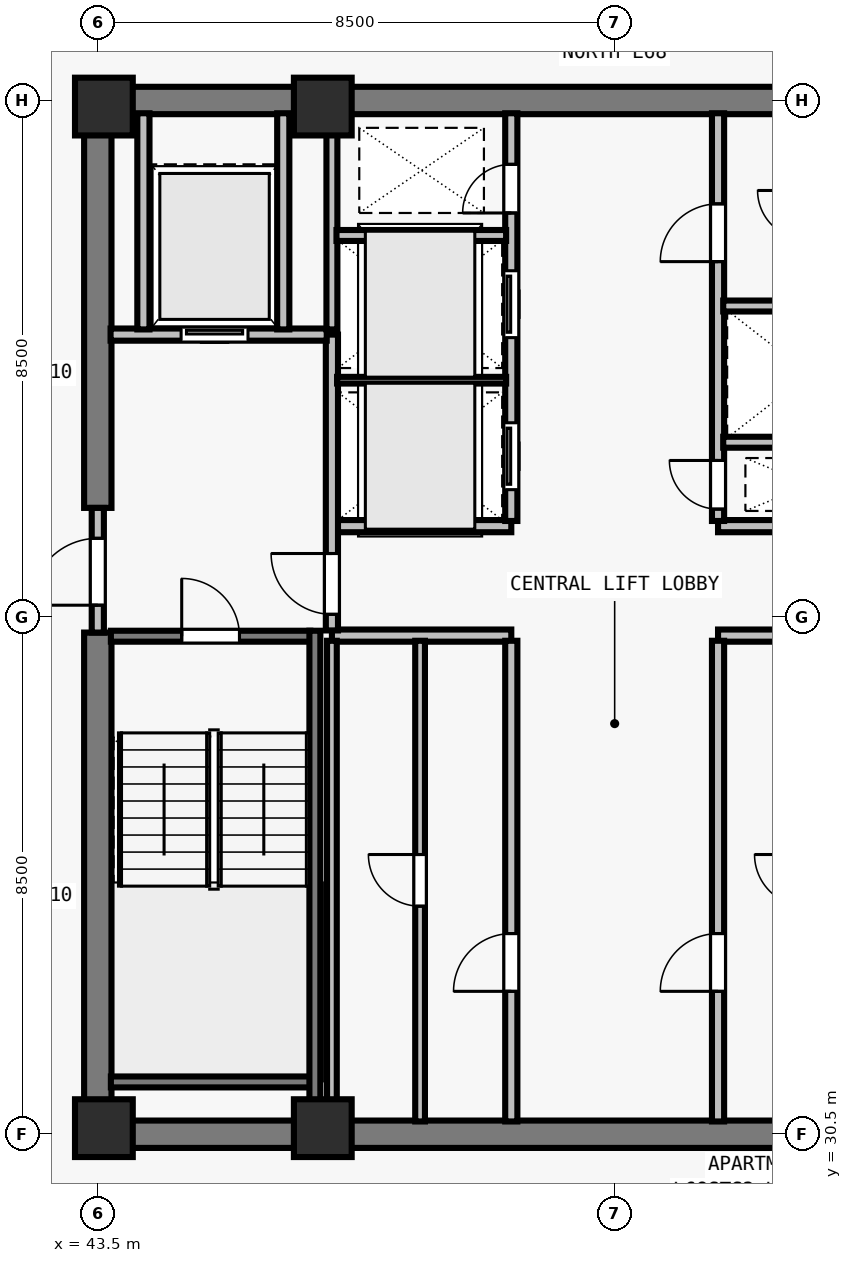
"""IFC4 building model, lengths in metres.
Left out: names, types, materials, properties, quantities, classifications, styles, units other than length and angle.
Written with IfcOpenShell. Run it as: python <this file> out.ifc"""

import sys

from ifc_helpers import new_model, si_unit, direction, frame, frame_2d, origin, origin_2d, place, context, subcontext, project, spatial, rectangle, extrude, element, fill, save


model = new_model("IFC4")
c1 = context("Model", 3, precision=1e-05, world=origin(), true_north=direction((0.0, 1.0)))
c2 = subcontext(c1, "Body", "Model", "MODEL_VIEW")
j1 = project(units=[si_unit("LENGTHUNIT", "METRE"), si_unit("PLANEANGLEUNIT", "RADIAN")], contexts=[c1])
p1 = place(None, origin())
s1 = spatial("IfcSite", under=j1, at=p1, CompositionType="ELEMENT")
p2 = place(p1, origin())
s2 = spatial("IfcBuilding", under=s1, at=p2, CompositionType="ELEMENT")
p3 = place(p2, frame((0.0, 0.0, 248.0)))
s3 = spatial("IfcBuildingStorey", under=s2, at=p3, CompositionType="ELEMENT", Elevation=248.0)
for number, where, z_axis, x_axis in (
    (1, (43.6, 30.6, 0.0), (0.0, 0.0, 1.0), (1.0, 0.0, 0.0)),
    (2, (47.2, 30.6, 0.0), (0.0, 0.0, 1.0), (1.0, 0.0, 0.0)),
    (3, (43.6, 47.4, 0.0), (0.0, 0.0, 1.0), (1.0, 0.0, 0.0)),
    (4, (47.2, 47.4, 0.0), (0.0, 0.0, 1.0), (1.0, 0.0, 0.0)),
):
    element("IfcColumn", number, at=place(p3, frame(where, z_axis=z_axis, x_axis=x_axis)), inside=s3, PredefinedType="COLUMN", context=c2, shape_type="SweptSolid", body=[
        extrude(rectangle(XDim=0.95, YDim=0.95, at=origin_2d()), origin(), (0.0, 0.0, 1.0), 3.5),
    ])
for number, where, z_axis, x_axis in (
    (5, (43.275, 30.5, 0.0), (0.0, 0.0, 1.0), (1.0, 0.0, 0.0)),
    (6, (43.275, 47.5, 0.0), (0.0, 0.0, 1.0), (1.0, 0.0, 0.0)),
):
    element("IfcWall", number, at=place(p3, frame(where, z_axis=z_axis, x_axis=x_axis)), inside=s3, PredefinedType="SHEAR", context=c2, shape_type="SweptSolid", body=[
        extrude(rectangle(XDim=17.45, YDim=0.45, at=frame_2d((8.725, 0.0))), origin(), (0.0, 0.0, 1.0), 3.29),
    ])
p4 = place(p3, frame((43.5, 30.715, 0.0), z_axis=(0.0, 0.0, 1.0), x_axis=(0.0, 1.0, 0.0)))
e7 = element("IfcWall", 7, at=p4, inside=s3, PredefinedType="SHEAR", context=c2, shape_type="SweptSolid", body=[
    extrude(rectangle(XDim=8.035, YDim=0.45, at=frame_2d((4.018, 0.0))), origin(), (0.0, 0.0, 1.0), 3.29),
])
p5 = place(p3, frame((43.5, 40.8, 0.0), z_axis=(0.0, 0.0, 1.0), x_axis=(0.0, 1.0, 0.0)))
e8 = element("IfcWall", 8, at=p5, inside=s3, PredefinedType="SHEAR", context=c2, shape_type="SweptSolid", body=[
    extrude(rectangle(XDim=6.485, YDim=0.45, at=frame_2d((3.242, 0.0))), origin(), (0.0, 0.0, 1.0), 3.29),
])
for number, where, z_axis, x_axis in (
    (9, (47.35, 38.7, 0.0), (0.0, 0.0, 1.0), (1.0, 0.0, 0.0)),
    (10, (47.35, 40.5, 0.0), (0.0, 0.0, 1.0), (1.0, 0.0, 0.0)),
    (11, (53.7, 38.7, 0.0), (0.0, 0.0, 1.0), (1.0, 0.0, 0.0)),
    (12, (53.7, 40.5, 0.0), (0.0, 0.0, 1.0), (1.0, 0.0, 0.0)),
):
    element("IfcWall", number, at=place(p3, frame(where, z_axis=z_axis, x_axis=x_axis)), inside=s3, PredefinedType="SOLIDWALL", context=c2, shape_type="SweptSolid", body=[
        extrude(rectangle(XDim=2.95, YDim=0.2, at=frame_2d((1.475, 0.0))), origin(), (0.0, 0.0, 1.0), 3.29),
    ])
p6 = place(p3, frame((50.3, 30.71, 0.0), z_axis=(0.0, 0.0, 1.0), x_axis=(0.0, 1.0, 0.0)))
e13 = element("IfcWall", 13, at=p6, inside=s3, PredefinedType="SOLIDWALL", context=c2, shape_type="SweptSolid", body=[
    extrude(rectangle(XDim=7.905, YDim=0.2, at=frame_2d((3.953, 0.0))), origin(), (0.0, 0.0, 1.0), 3.29),
])
p7 = place(p6, frame((2.14, 0.0, 0.0)))
e14 = element("IfcOpeningElement", 14, at=p7, cuts=e13, PredefinedType="OPENING", context=c2, shape_type="SweptSolid", body=[
    extrude(rectangle(XDim=0.95, YDim=2.12, at=frame_2d((0.475, 1.06))), frame((0.0, 0.11, 0.0), z_axis=(0.0, -1.0, 0.0), x_axis=(1.0, 0.0, 0.0)), (0.0, 0.0, 1.0), 0.22),
])
p8 = place(p3, frame((53.7, 30.71, 0.0), z_axis=(0.0, 0.0, 1.0), x_axis=(0.0, 1.0, 0.0)))
e15 = element("IfcWall", 15, at=p8, inside=s3, PredefinedType="SOLIDWALL", context=c2, shape_type="SweptSolid", body=[
    extrude(rectangle(XDim=7.905, YDim=0.2, at=frame_2d((3.953, 0.0))), origin(), (0.0, 0.0, 1.0), 3.29),
])
p9 = place(p8, frame((2.14, 0.0, 0.0)))
e16 = element("IfcOpeningElement", 16, at=p9, cuts=e15, PredefinedType="OPENING", context=c2, shape_type="SweptSolid", body=[
    extrude(rectangle(XDim=0.95, YDim=2.12, at=frame_2d((0.475, 1.06))), frame((0.0, 0.11, 0.0), z_axis=(0.0, -1.0, 0.0), x_axis=(1.0, 0.0, 0.0)), (0.0, 0.0, 1.0), 0.22),
])
p10 = place(p3, frame((50.3, 40.585, 0.0), z_axis=(0.0, 0.0, 1.0), x_axis=(0.0, 1.0, 0.0)))
e17 = element("IfcWall", 17, at=p10, inside=s3, PredefinedType="SOLIDWALL", context=c2, shape_type="SweptSolid", body=[
    extrude(rectangle(XDim=6.705, YDim=0.2, at=frame_2d((3.353, 0.0))), origin(), (0.0, 0.0, 1.0), 3.29),
])
p11 = place(p10, frame((0.515, 0.0, 0.0)))
e18 = element("IfcOpeningElement", 18, at=p11, cuts=e17, PredefinedType="OPENING", context=c2, shape_type="SweptSolid", body=[
    extrude(rectangle(XDim=1.1, YDim=2.2, at=frame_2d((0.55, 1.1))), frame((0.0, 0.11, 0.0), z_axis=(0.0, -1.0, 0.0), x_axis=(1.0, 0.0, 0.0)), (0.0, 0.0, 1.0), 0.22),
])
p12 = place(p10, frame((3.015, 0.0, 0.0)))
e19 = element("IfcOpeningElement", 19, at=p12, cuts=e17, PredefinedType="OPENING", context=c2, shape_type="SweptSolid", body=[
    extrude(rectangle(XDim=1.1, YDim=2.2, at=frame_2d((0.55, 1.1))), frame((0.0, 0.11, 0.0), z_axis=(0.0, -1.0, 0.0), x_axis=(1.0, 0.0, 0.0)), (0.0, 0.0, 1.0), 0.22),
])
p13 = place(p10, frame((5.065, 0.0, 0.0)))
e20 = element("IfcOpeningElement", 20, at=p13, cuts=e17, PredefinedType="OPENING", context=c2, shape_type="SweptSolid", body=[
    extrude(rectangle(XDim=0.8, YDim=2.08, at=frame_2d((0.4, 1.04))), frame((0.0, 0.11, 0.0), z_axis=(0.0, -1.0, 0.0), x_axis=(1.0, 0.0, 0.0)), (0.0, 0.0, 1.0), 0.22),
])
p14 = place(p3, frame((53.7, 40.585, 0.0), z_axis=(0.0, 0.0, 1.0), x_axis=(0.0, 1.0, 0.0)))
e21 = element("IfcWall", 21, at=p14, inside=s3, PredefinedType="SOLIDWALL", context=c2, shape_type="SweptSolid", body=[
    extrude(rectangle(XDim=6.705, YDim=0.2, at=frame_2d((3.353, 0.0))), origin(), (0.0, 0.0, 1.0), 3.29),
])
p15 = place(p14, frame((0.195, 0.0, 0.0)))
e22 = element("IfcOpeningElement", 22, at=p15, cuts=e21, PredefinedType="OPENING", context=c2, shape_type="SweptSolid", body=[
    extrude(rectangle(XDim=0.8, YDim=2.08, at=frame_2d((0.4, 1.04))), frame((0.0, 0.11, 0.0), z_axis=(0.0, -1.0, 0.0), x_axis=(1.0, 0.0, 0.0)), (0.0, 0.0, 1.0), 0.22),
])
p16 = place(p14, frame((4.265, 0.0, 0.0)))
e23 = element("IfcOpeningElement", 23, at=p16, cuts=e21, PredefinedType="OPENING", context=c2, shape_type="SweptSolid", body=[
    extrude(rectangle(XDim=0.95, YDim=2.12, at=frame_2d((0.475, 1.06))), frame((0.0, 0.11, 0.0), z_axis=(0.0, -1.0, 0.0), x_axis=(1.0, 0.0, 0.0)), (0.0, 0.0, 1.0), 0.22),
])
p17 = place(p3, frame((43.5, 38.75, 0.0), z_axis=(0.0, 0.0, 1.0), x_axis=(0.0, 1.0, 0.0)))
e24 = element("IfcWall", 24, at=p17, inside=s3, PredefinedType="SOLIDWALL", context=c2, shape_type="SweptSolid", body=[
    extrude(rectangle(XDim=2.05, YDim=0.2, at=frame_2d((1.025, 0.0))), origin(), (0.0, 0.0, 1.0), 3.29),
])
p18 = place(p17, frame((0.45, 0.0, 0.0)))
e25 = element("IfcOpeningElement", 25, at=p18, cuts=e24, PredefinedType="OPENING", context=c2, shape_type="SweptSolid", body=[
    extrude(rectangle(XDim=1.1, YDim=2.15, at=frame_2d((0.55, 1.075))), frame((0.0, 0.11, 0.0), z_axis=(0.0, -1.0, 0.0), x_axis=(1.0, 0.0, 0.0)), (0.0, 0.0, 1.0), 0.22),
])
p19 = place(p3, frame((47.35, 38.785, 0.0), z_axis=(0.0, 0.0, 1.0), x_axis=(0.0, 1.0, 0.0)))
e26 = element("IfcWall", 26, at=p19, inside=s3, PredefinedType="SOLIDWALL", context=c2, shape_type="SweptSolid", body=[
    extrude(rectangle(XDim=4.865, YDim=0.2, at=frame_2d((2.433, 0.0))), origin(), (0.0, 0.0, 1.0), 3.29),
])
p20 = place(p19, frame((0.265, 0.0, 0.0)))
e27 = element("IfcOpeningElement", 27, at=p20, cuts=e26, PredefinedType="OPENING", context=c2, shape_type="SweptSolid", body=[
    extrude(rectangle(XDim=1.0, YDim=2.15, at=frame_2d((0.5, 1.075))), frame((0.0, 0.11, 0.0), z_axis=(0.0, -1.0, 0.0), x_axis=(1.0, 0.0, 0.0)), (0.0, 0.0, 1.0), 0.22),
])
p21 = place(p3, frame((43.71, 43.65, 0.0), z_axis=(0.0, 0.0, 1.0), x_axis=(1.0, 0.0, 0.0)))
e28 = element("IfcWall", 28, at=p21, inside=s3, PredefinedType="SOLIDWALL", context=c2, shape_type="SweptSolid", body=[
    extrude(rectangle(XDim=3.555, YDim=0.2, at=frame_2d((1.777, 0.0))), origin(), (0.0, 0.0, 1.0), 3.29),
])
p22 = place(p21, frame((1.16, 0.0, 0.0)))
e29 = element("IfcOpeningElement", 29, at=p22, cuts=e28, PredefinedType="OPENING", context=c2, shape_type="SweptSolid", body=[
    extrude(rectangle(XDim=1.1, YDim=2.2, at=frame_2d((0.55, 1.1))), frame((0.0, 0.11, 0.0), z_axis=(0.0, -1.0, 0.0), x_axis=(1.0, 0.0, 0.0)), (0.0, 0.0, 1.0), 0.22),
])
for number, where, z_axis, x_axis in (
    (30, (46.55, 43.735, 0.0), (0.0, 0.0, 1.0), (0.0, 1.0, 0.0)),
    (31, (44.25, 43.735, 0.0), (0.0, 0.0, 1.0), (0.0, 1.0, 0.0)),
):
    element("IfcWall", number, at=place(p3, frame(where, z_axis=z_axis, x_axis=x_axis)), inside=s3, PredefinedType="SOLIDWALL", context=c2, shape_type="SweptSolid", body=[
        extrude(rectangle(XDim=3.555, YDim=0.2, at=frame_2d((1.777, 0.0))), origin(), (0.0, 0.0, 1.0), 3.29),
    ])
p23 = place(p3, frame((47.35, 30.71, 0.0), z_axis=(0.0, 0.0, 1.0), x_axis=(0.0, 1.0, 0.0)))
e32 = element("IfcWall", 32, at=p23, inside=s3, PredefinedType="PARTITIONING", context=c2, shape_type="SweptSolid", body=[
    extrude(rectangle(XDim=7.905, YDim=0.16, at=frame_2d((3.953, 0.0))), origin(), (0.0, 0.0, 1.0), 3.29),
])
p24 = place(p3, frame((48.8, 30.71, 0.0), z_axis=(0.0, 0.0, 1.0), x_axis=(0.0, 1.0, 0.0)))
e33 = element("IfcWall", 33, at=p24, inside=s3, PredefinedType="PARTITIONING", context=c2, shape_type="SweptSolid", body=[
    extrude(rectangle(XDim=7.905, YDim=0.16, at=frame_2d((3.953, 0.0))), origin(), (0.0, 0.0, 1.0), 3.29),
])
p25 = place(p24, frame((3.54, 0.0, 0.0)))
e34 = element("IfcOpeningElement", 34, at=p25, cuts=e33, PredefinedType="OPENING", context=c2, shape_type="SweptSolid", body=[
    extrude(rectangle(XDim=0.85, YDim=2.12, at=frame_2d((0.425, 1.06))), frame((0.0, 0.09, 0.0), z_axis=(0.0, -1.0, 0.0), x_axis=(1.0, 0.0, 0.0)), (0.0, 0.0, 1.0), 0.18),
])
p26 = place(p3, frame((47.35, 43.735, 0.0), z_axis=(0.0, 0.0, 1.0), x_axis=(0.0, 1.0, 0.0)))
e35 = element("IfcWall", 35, at=p26, inside=s3, PredefinedType="SOLIDWALL", context=c2, shape_type="SweptSolid", body=[
    extrude(rectangle(XDim=3.555, YDim=0.18, at=frame_2d((1.777, 0.0))), origin(), (0.0, 0.0, 1.0), 3.29),
])
p27 = place(p3, frame((47.435, 42.9, 0.0), z_axis=(0.0, 0.0, 1.0), x_axis=(1.0, 0.0, 0.0)))
e36 = element("IfcWall", 36, at=p27, inside=s3, PredefinedType="PARTITIONING", context=c2, shape_type="SweptSolid", body=[
    extrude(rectangle(XDim=2.78, YDim=0.11, at=frame_2d((1.39, 0.0))), origin(), (0.0, 0.0, 1.0), 3.29),
])
p28 = place(p3, frame((47.425, 45.28, 0.0), z_axis=(0.0, 0.0, 1.0), x_axis=(1.0, 0.0, 0.0)))
e37 = element("IfcWall", 37, at=p28, inside=s3, PredefinedType="SOLIDWALL", context=c2, shape_type="SweptSolid", body=[
    extrude(rectangle(XDim=2.79, YDim=0.18, at=frame_2d((1.395, 0.0))), origin(), (0.0, 0.0, 1.0), 3.29),
])
p29 = place(p3, frame((53.785, 41.88, 0.0), z_axis=(0.0, 0.0, 1.0), x_axis=(1.0, 0.0, 0.0)))
e38 = element("IfcWall", 38, at=p29, inside=s3, PredefinedType="SOLIDWALL", context=c2, shape_type="SweptSolid", body=[
    extrude(rectangle(XDim=2.78, YDim=0.18, at=frame_2d((1.39, 0.0))), origin(), (0.0, 0.0, 1.0), 3.29),
])
p30 = place(p3, frame((53.785, 44.12, 0.0), z_axis=(0.0, 0.0, 1.0), x_axis=(1.0, 0.0, 0.0)))
e39 = element("IfcWall", 39, at=p30, inside=s3, PredefinedType="SOLIDWALL", context=c2, shape_type="SweptSolid", body=[
    extrude(rectangle(XDim=2.79, YDim=0.18, at=frame_2d((1.395, 0.0))), origin(), (0.0, 0.0, 1.0), 3.29),
])
p31 = place(p3, frame((43.715, 38.69, 0.0), z_axis=(0.0, 0.0, 1.0), x_axis=(1.0, 0.0, 0.0)))
e40 = element("IfcWall", 40, at=p31, inside=s3, PredefinedType="SOLIDWALL", context=c2, shape_type="SweptSolid", body=[
    extrude(rectangle(XDim=3.28, YDim=0.18, at=frame_2d((1.64, 0.0))), origin(), (0.0, 0.0, 1.0), 3.29),
])
p32 = place(p31, frame((1.165, 0.0, 0.0)))
e41 = element("IfcOpeningElement", 41, at=p32, cuts=e40, PredefinedType="OPENING", context=c2, shape_type="SweptSolid", body=[
    extrude(rectangle(XDim=0.95, YDim=2.15, at=frame_2d((0.475, 1.075))), frame((0.0, 0.1, 0.0), z_axis=(0.0, -1.0, 0.0), x_axis=(1.0, 0.0, 0.0)), (0.0, 0.0, 1.0), 0.2),
])
p33 = place(p3, frame((43.715, 31.36, 0.0), z_axis=(0.0, 0.0, 1.0), x_axis=(1.0, 0.0, 0.0)))
e42 = element("IfcWall", 42, at=p33, inside=s3, PredefinedType="SOLIDWALL", context=c2, shape_type="SweptSolid", body=[
    extrude(rectangle(XDim=3.28, YDim=0.18, at=frame_2d((1.64, 0.0))), origin(), (0.0, 0.0, 1.0), 3.29),
])
p34 = place(p3, frame((47.07, 38.78, 0.0), z_axis=(0.0, 0.0, 1.0), x_axis=(0.0, -1.0, 0.0)))
e43 = element("IfcWall", 43, at=p34, inside=s3, PredefinedType="SOLIDWALL", context=c2, shape_type="SweptSolid", body=[
    extrude(rectangle(XDim=8.067, YDim=0.18, at=frame_2d((4.034, 0.0))), origin(), (0.0, 0.0, 1.0), 3.29),
])
p35 = place(p18, origin())
e44 = element("IfcDoor", 44, at=p35, inside=s3, OperationType="SINGLE_SWING_LEFT", PredefinedType="DOOR", context=c2, shape_type="SweptSolid", body=[
    extrude(rectangle(XDim=1.1, YDim=2.15, at=frame_2d((0.55, 1.075))), frame((0.0, 0.025, 0.0), z_axis=(0.0, -1.0, 0.0), x_axis=(1.0, 0.0, 0.0)), (0.0, 0.0, 1.0), 0.05),
])
fill(e25, e44)
p36 = place(p20, origin())
e45 = element("IfcDoor", 45, at=p36, inside=s3, OperationType="SINGLE_SWING_RIGHT", PredefinedType="DOOR", context=c2, shape_type="SweptSolid", body=[
    extrude(rectangle(XDim=1.0, YDim=2.15, at=frame_2d((0.5, 1.075))), frame((0.0, 0.025, 0.0), z_axis=(0.0, -1.0, 0.0), x_axis=(1.0, 0.0, 0.0)), (0.0, 0.0, 1.0), 0.05),
])
fill(e27, e45)
p37 = place(p22, origin())
e46 = element("IfcDoor", 46, at=p37, inside=s3, OperationType="SLIDING_TO_LEFT", PredefinedType="DOOR", context=c2, shape_type="SweptSolid", body=[
    extrude(rectangle(XDim=1.1, YDim=2.2, at=frame_2d((0.55, 1.1))), frame((0.0, 0.025, 0.0), z_axis=(0.0, -1.0, 0.0), x_axis=(1.0, 0.0, 0.0)), (0.0, 0.0, 1.0), 0.05),
])
fill(e29, e46)
p38 = place(p7, origin())
e47 = element("IfcDoor", 47, at=p38, inside=s3, OperationType="SINGLE_SWING_LEFT", PredefinedType="DOOR", context=c2, shape_type="SweptSolid", body=[
    extrude(rectangle(XDim=0.95, YDim=2.12, at=frame_2d((0.475, 1.06))), frame((0.0, 0.025, 0.0), z_axis=(0.0, -1.0, 0.0), x_axis=(1.0, 0.0, 0.0)), (0.0, 0.0, 1.0), 0.05),
])
fill(e14, e47)
p39 = place(p25, origin())
e48 = element("IfcDoor", 48, at=p39, inside=s3, OperationType="SINGLE_SWING_RIGHT", PredefinedType="DOOR", context=c2, shape_type="SweptSolid", body=[
    extrude(rectangle(XDim=0.85, YDim=2.12, at=frame_2d((0.425, 1.06))), frame((0.0, 0.025, 0.0), z_axis=(0.0, -1.0, 0.0), x_axis=(1.0, 0.0, 0.0)), (0.0, 0.0, 1.0), 0.05),
])
fill(e34, e48)
p40 = place(p9, origin())
e49 = element("IfcDoor", 49, at=p40, inside=s3, OperationType="SINGLE_SWING_LEFT", PredefinedType="DOOR", context=c2, shape_type="SweptSolid", body=[
    extrude(rectangle(XDim=0.95, YDim=2.12, at=frame_2d((0.475, 1.06))), frame((0.0, 0.025, 0.0), z_axis=(0.0, -1.0, 0.0), x_axis=(1.0, 0.0, 0.0)), (0.0, 0.0, 1.0), 0.05),
])
fill(e16, e49)
p41 = place(p11, origin())
e50 = element("IfcDoor", 50, at=p41, inside=s3, OperationType="SLIDING_TO_LEFT", PredefinedType="DOOR", context=c2, shape_type="SweptSolid", body=[
    extrude(rectangle(XDim=1.1, YDim=2.2, at=frame_2d((0.55, 1.1))), frame((0.0, 0.025, 0.0), z_axis=(0.0, -1.0, 0.0), x_axis=(1.0, 0.0, 0.0)), (0.0, 0.0, 1.0), 0.05),
])
fill(e18, e50)
p42 = place(p12, origin())
e51 = element("IfcDoor", 51, at=p42, inside=s3, OperationType="SLIDING_TO_LEFT", PredefinedType="DOOR", context=c2, shape_type="SweptSolid", body=[
    extrude(rectangle(XDim=1.1, YDim=2.2, at=frame_2d((0.55, 1.1))), frame((0.0, 0.025, 0.0), z_axis=(0.0, -1.0, 0.0), x_axis=(1.0, 0.0, 0.0)), (0.0, 0.0, 1.0), 0.05),
])
fill(e19, e51)
p43 = place(p13, origin())
e52 = element("IfcDoor", 52, at=p43, inside=s3, OperationType="SINGLE_SWING_LEFT", PredefinedType="DOOR", context=c2, shape_type="SweptSolid", body=[
    extrude(rectangle(XDim=0.8, YDim=2.08, at=frame_2d((0.4, 1.04))), frame((0.0, 0.025, 0.0), z_axis=(0.0, -1.0, 0.0), x_axis=(1.0, 0.0, 0.0)), (0.0, 0.0, 1.0), 0.05),
])
fill(e20, e52)
p44 = place(p15, origin())
e53 = element("IfcDoor", 53, at=p44, inside=s3, OperationType="SINGLE_SWING_RIGHT", PredefinedType="DOOR", context=c2, shape_type="SweptSolid", body=[
    extrude(rectangle(XDim=0.8, YDim=2.08, at=frame_2d((0.4, 1.04))), frame((0.0, 0.025, 0.0), z_axis=(0.0, -1.0, 0.0), x_axis=(1.0, 0.0, 0.0)), (0.0, 0.0, 1.0), 0.05),
])
fill(e22, e53)
p45 = place(p16, origin())
e54 = element("IfcDoor", 54, at=p45, inside=s3, OperationType="SINGLE_SWING_LEFT", PredefinedType="DOOR", context=c2, shape_type="SweptSolid", body=[
    extrude(rectangle(XDim=0.95, YDim=2.12, at=frame_2d((0.475, 1.06))), frame((0.0, 0.025, 0.0), z_axis=(0.0, -1.0, 0.0), x_axis=(1.0, 0.0, 0.0)), (0.0, 0.0, 1.0), 0.05),
])
fill(e23, e54)
p46 = place(p32, origin())
e55 = element("IfcDoor", 55, at=p46, inside=s3, OperationType="SINGLE_SWING_LEFT", PredefinedType="DOOR", context=c2, shape_type="SweptSolid", body=[
    extrude(rectangle(XDim=0.95, YDim=2.15, at=frame_2d((0.475, 1.075))), frame((0.0, 0.025, 0.0), z_axis=(0.0, -1.0, 0.0), x_axis=(1.0, 0.0, 0.0)), (0.0, 0.0, 1.0), 0.05),
])
fill(e41, e55)
save(model, sys.argv[1])
